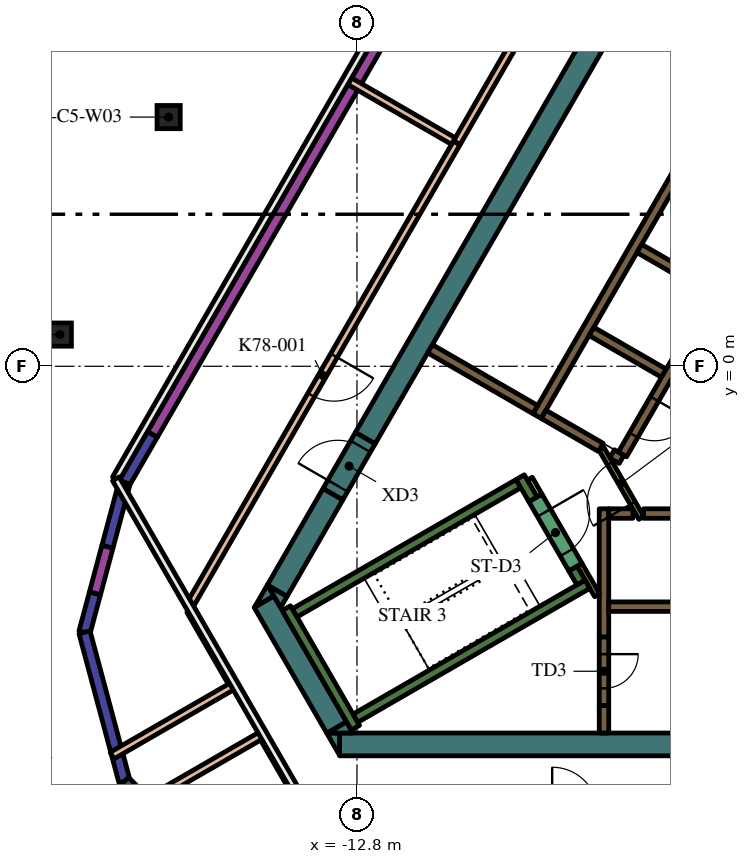
"""IFC4 building model, lengths in metres.
Left out: names, types, materials, properties, quantities, classifications, styles, units other than length and angle.
Written with IfcOpenShell. Run it as: python <this file> out.ifc"""

import sys

from ifc_helpers import new_model, si_unit, direction, frame, frame_2d, origin, origin_2d, place, context, subcontext, project, spatial, polyline, rectangle, hollow_circle, outline, extrude, element, fill, save


model = new_model("IFC4")
c1 = context("Model", 3, precision=1e-05, world=origin(), true_north=direction((0.0, 1.0)))
c2 = subcontext(c1, "Body", "Model", "MODEL_VIEW")
j1 = project(units=[si_unit("LENGTHUNIT", "METRE"), si_unit("PLANEANGLEUNIT", "RADIAN")], contexts=[c1])
p1 = place(None, origin())
s1 = spatial("IfcSite", under=j1, at=p1, CompositionType="ELEMENT")
p2 = place(p1, origin())
s2 = spatial("IfcBuilding", under=s1, at=p2, CompositionType="ELEMENT")
p3 = place(p2, frame((0.0, 0.0, 336.0)))
s3 = spatial("IfcBuildingStorey", under=s2, at=p3, CompositionType="ELEMENT", Elevation=336.0)
for number, where, z_axis, x_axis in (
    (1, (-17.756, 6.557, 0.0), (0.0, 0.0, 1.0), (1.0, 0.0, 0.0)),
    (2, (-20.619, 0.834, 0.0), (0.0, 0.0, 1.0), (1.0, 0.0, 0.0)),
):
    element("IfcColumn", number, at=place(p3, frame(where, z_axis=z_axis, x_axis=x_axis)), inside=s3, PredefinedType="COLUMN", context=c2, shape_type="SweptSolid", body=[
        extrude(hollow_circle(Radius=0.305, WallThickness=0.025, at=origin_2d()), origin(), (0.0, 0.0, 1.0), 4.2),
    ])
p4 = place(p3, frame((8.904, -9.95, 0.0), z_axis=(0.0, 0.0, 1.0), x_axis=(-1.0, 0.0, 0.0)))
e3 = element("IfcWall", 3, at=p4, inside=s3, PredefinedType="SOLIDWALL", context=c2, shape_type="SweptSolid", body=[
    extrude(rectangle(XDim=22.161, YDim=0.6, at=frame_2d((11.081, 0.0))), origin(), (0.0, 0.0, 1.0), 4.2),
])
p5 = place(p3, origin())
e4 = element("IfcWall", 4, at=p5, inside=s3, PredefinedType="SOLIDWALL", context=c2, shape_type="SweptSolid", body=[
    extrude(outline(polyline([(-13.597, -9.65), (-13.259, -9.65), (-13.259, -10.236), (-13.597, -9.65)])), origin(), (0.0, 0.0, 1.0), 4.2),
])
p6 = place(p3, frame((-13.333, -9.506, 0.0), z_axis=(0.0, 0.0, 1.0), x_axis=(-0.500019073792, 0.866014391245, 0.0)))
e5 = element("IfcWall", 5, at=p6, inside=s3, PredefinedType="SOLIDWALL", context=c2, shape_type="SweptSolid", body=[
    extrude(rectangle(XDim=3.823, YDim=0.6, at=frame_2d((1.912, 0.0))), origin(), (0.0, 0.0, 1.0), 4.2),
])
e6 = element("IfcWall", 6, at=p5, inside=s3, PredefinedType="SOLIDWALL", context=c2, shape_type="SweptSolid", body=[
    extrude(outline(polyline([(-14.987, -6.043), (-15.493, -6.335), (-15.156, -5.75), (-14.987, -6.043)])), origin(), (0.0, 0.0, 1.0), 4.2),
])
e7 = element("IfcWall", 7, at=p5, inside=s3, PredefinedType="SOLIDWALL", context=c2, shape_type="SweptSolid", body=[
    extrude(outline(polyline([(-12.904, -9.65), (-13.58, -9.65), (-13.073, -9.357), (-12.904, -9.65)])), origin(), (0.0, 0.0, 1.0), 4.2),
])
p7 = place(p3, frame((-13.432, -3.364, 0.0), z_axis=(0.0, 0.0, 1.0), x_axis=(-0.499960127962, -0.866048422692, 0.0)))
e8 = element("IfcWall", 8, at=p7, inside=s3, PredefinedType="SOLIDWALL", context=c2, shape_type="SweptSolid", body=[
    extrude(rectangle(XDim=2.934, YDim=0.6, at=frame_2d((1.467, 0.0))), origin(), (0.0, 0.0, 1.0), 4.2),
])
e9 = element("IfcWall", 9, at=p5, inside=s3, PredefinedType="SOLIDWALL", context=c2, shape_type="SweptSolid", body=[
    extrude(outline(polyline([(-14.809, -6.35), (-15.147, -5.764), (-14.64, -6.057), (-14.809, -6.35)])), origin(), (0.0, 0.0, 1.0), 4.2),
])
p8 = place(p3, frame((-4.652, 11.842, 0.0), z_axis=(0.0, 0.0, 1.0), x_axis=(-0.500003640647, -0.866023301845, 0.0)))
e10 = element("IfcWall", 10, at=p8, inside=s3, PredefinedType="SOLIDWALL", context=c2, shape_type="SweptSolid", body=[
    extrude(rectangle(XDim=15.858, YDim=0.6, at=frame_2d((7.929, 0.0))), origin(), (0.0, 0.0, 1.0), 4.2),
])
p9 = place(p3, frame((-12.84, -9.511, 0.0), z_axis=(0.0, 0.0, 1.0), x_axis=(-0.499997733992, 0.866026712061, 0.0)))
e11 = element("IfcWall", 11, at=p9, inside=s3, PredefinedType="SOLIDWALL", context=c2, shape_type="SweptSolid", body=[
    extrude(rectangle(XDim=3.634, YDim=0.25, at=frame_2d((1.817, 0.0))), origin(), (0.0, 0.0, 1.0), 4.2),
])
p10 = place(p3, frame((-14.44, -6.49, 0.0), z_axis=(0.0, 0.0, 1.0), x_axis=(0.866022966069, 0.500004222222, 0.0)))
e12 = element("IfcWall", 12, at=p10, inside=s3, PredefinedType="SOLIDWALL", context=c2, shape_type="SweptSolid", body=[
    extrude(rectangle(XDim=6.8, YDim=0.25, at=frame_2d((3.4, 0.0))), origin(), (0.0, 0.0, 1.0), 4.2),
])
p11 = place(p3, frame((-8.168, -3.503, 0.0), z_axis=(0.0, 0.0, 1.0), x_axis=(-0.499952099219, 0.866053057547, 0.0)))
e13 = element("IfcWall", 13, at=p11, inside=s3, PredefinedType="SOLIDWALL", context=c2, shape_type="SweptSolid", body=[
    extrude(rectangle(XDim=0.675, YDim=0.25, at=frame_2d((0.337, 0.0))), origin(), (0.0, 0.0, 1.0), 4.2),
])
p12 = place(p3, frame((-12.84, -9.261, 0.0), z_axis=(0.0, 0.0, 1.0), x_axis=(0.866016039709, 0.500016218704, 0.0)))
e14 = element("IfcWall", 14, at=p12, inside=s3, PredefinedType="SOLIDWALL", context=c2, shape_type="SweptSolid", body=[
    extrude(rectangle(XDim=7.05, YDim=0.25, at=frame_2d((3.525, 0.0))), origin(), (0.0, 0.0, 1.0), 4.2),
])
p13 = place(p3, frame((-6.905, -5.69, 0.0), z_axis=(0.0, 0.0, 1.0), x_axis=(-0.500402024738, 0.865793170242, 0.0)))
e15 = element("IfcWall", 15, at=p13, inside=s3, PredefinedType="SOLIDWALL", context=c2, shape_type="SweptSolid", body=[
    extrude(rectangle(XDim=0.425, YDim=0.25, at=frame_2d((0.212, 0.0))), origin(), (0.0, 0.0, 1.0), 4.2),
])
p14 = place(p3, frame((-5.259, -3.875, 0.0), z_axis=(0.0, 0.0, 1.0), x_axis=(1.0, 0.0, 0.0)))
e16 = element("IfcWall", 16, at=p14, inside=s3, PredefinedType="SOLIDWALL", context=c2, shape_type="SweptSolid", body=[
    extrude(rectangle(XDim=10.489, YDim=0.25, at=frame_2d((5.244, 0.0))), origin(), (0.0, 0.0, 1.0), 4.2),
])
p15 = place(p3, frame((-6.3, -7.125, 0.0), z_axis=(0.0, 0.0, 1.0), x_axis=(0.0, 1.0, 0.0)))
e17 = element("IfcWall", 17, at=p15, inside=s3, PredefinedType="SOLIDWALL", context=c2, shape_type="SweptSolid", body=[
    extrude(rectangle(XDim=3.375, YDim=0.25, at=frame_2d((1.687, 0.0))), origin(), (0.0, 0.0, 1.0), 4.2),
])
p16 = place(p3, frame((-6.175, -3.875, 0.0), z_axis=(0.0, 0.0, 1.0), x_axis=(1.0, 0.0, 0.0)))
e18 = element("IfcWall", 18, at=p16, inside=s3, PredefinedType="SOLIDWALL", context=c2, shape_type="SweptSolid", body=[
    extrude(rectangle(XDim=0.637, YDim=0.25, at=frame_2d((0.318, 0.0))), origin(), (0.0, 0.0, 1.0), 4.2),
])
p17 = place(p3, frame((-6.3, -8.925, 0.0), z_axis=(0.0, 0.0, 1.0), x_axis=(0.0, -1.0, 0.0)))
e19 = element("IfcWall", 19, at=p17, inside=s3, PredefinedType="SOLIDWALL", context=c2, shape_type="SweptSolid", body=[
    extrude(rectangle(XDim=0.725, YDim=0.25, at=frame_2d((0.363, 0.0))), origin(), (0.0, 0.0, 1.0), 4.2),
])
p18 = place(p3, frame((-8.06, -1.311, 0.0), z_axis=(0.0, 0.0, 1.0), x_axis=(0.50000273126, 0.866023826885, 0.0)))
e20 = element("IfcWall", 20, at=p18, inside=s3, PredefinedType="SOLIDWALL", context=c2, shape_type="SweptSolid", body=[
    extrude(rectangle(XDim=10.33, YDim=0.25, at=frame_2d((5.165, 0.0))), origin(), (0.0, 0.0, 1.0), 4.2),
])
for number, where, z_axis, x_axis in (
    (21, (-5.369, 3.1, 0.0), (0.0, 0.0, 1.0), (0.866, -0.5, 0.0)),
    (22, (-4.724, -0.182, 0.0), (0.0, 0.0, 1.0), (-0.866, 0.5, 0.0)),
):
    element("IfcWall", number, at=place(p3, frame(where, z_axis=z_axis, x_axis=x_axis)), inside=s3, PredefinedType="SOLIDWALL", context=c2, shape_type="SweptSolid", body=[
        extrude(rectangle(XDim=2.2, YDim=0.25, at=frame_2d((1.1, 0.0))), origin(), (0.0, 0.0, 1.0), 4.2),
    ])
p19 = place(p3, frame((-6.088, -2.305, 0.0), z_axis=(0.0, 0.0, 1.0), x_axis=(0.866059450854, -0.499941024108, 0.0)))
e23 = element("IfcWall", 23, at=p19, inside=s3, PredefinedType="SOLIDWALL", context=c2, shape_type="SweptSolid", body=[
    extrude(rectangle(XDim=0.29, YDim=0.25, at=frame_2d((0.145, 0.0))), origin(), (0.0, 0.0, 1.0), 4.2),
])
p20 = place(p3, frame((-7.889, -1.265, 0.0), z_axis=(0.0, 0.0, 1.0), x_axis=(0.865986741702, -0.500066958712, 0.0)))
e24 = element("IfcWall", 24, at=p20, inside=s3, PredefinedType="SOLIDWALL", context=c2, shape_type="SweptSolid", body=[
    extrude(rectangle(XDim=1.738, YDim=0.25, at=frame_2d((0.869, 0.0))), origin(), (0.0, 0.0, 1.0), 4.2),
])
p21 = place(p3, frame((-8.106, -1.14, 0.0), z_axis=(0.0, 0.0, 1.0), x_axis=(-0.866008981251, 0.500028443584, 0.0)))
e25 = element("IfcWall", 25, at=p21, inside=s3, PredefinedType="SOLIDWALL", context=c2, shape_type="SweptSolid", body=[
    extrude(rectangle(XDim=3.2, YDim=0.25, at=frame_2d((1.6, 0.0))), origin(), (0.0, 0.0, 1.0), 4.2),
])
p22 = place(p3, frame((-8.252, -2.958, 0.0), z_axis=(0.0, 0.0, 1.0), x_axis=(0.500174715838, -0.865924508047, 0.0)))
e26 = element("IfcWall", 26, at=p22, inside=s3, PredefinedType="PARTITIONING", context=c2, shape_type="SweptSolid", body=[
    extrude(rectangle(XDim=0.514, YDim=0.15, at=frame_2d((0.257, 0.0))), origin(), (0.0, 0.0, 1.0), 3.45),
])
p23 = place(p3, frame((-6.48, -6.027, 0.0), z_axis=(0.0, 0.0, 1.0), x_axis=(-0.499927229454, 0.866067413802, 0.0)))
e27 = element("IfcWall", 27, at=p23, inside=s3, PredefinedType="PARTITIONING", context=c2, shape_type="SweptSolid", body=[
    extrude(rectangle(XDim=0.929, YDim=0.15, at=frame_2d((0.464, 0.0))), origin(), (0.0, 0.0, 1.0), 4.2),
])
p24 = place(p3, frame((-6.175, -6.325, 0.0), z_axis=(0.0, 0.0, 1.0), x_axis=(1.0, 0.0, 0.0)))
e28 = element("IfcWall", 28, at=p24, inside=s3, PredefinedType="SOLIDWALL", context=c2, shape_type="SweptSolid", body=[
    extrude(rectangle(XDim=12.35, YDim=0.25, at=frame_2d((6.175, 0.0))), origin(), (0.0, 0.0, 1.0), 4.2),
])
p25 = place(p24, frame((3.205, 0.0, 0.0)))
e29 = element("IfcOpeningElement", 29, at=p25, cuts=e28, PredefinedType="OPENING", context=c2, shape_type="SweptSolid", body=[
    extrude(rectangle(XDim=0.9, YDim=2.1, at=frame_2d((0.45, 1.05))), frame((0.0, 0.135, 0.0), z_axis=(0.0, -1.0, 0.0), x_axis=(1.0, 0.0, 0.0)), (0.0, 0.0, 1.0), 0.27),
])
p26 = place(p24, frame((8.145, 0.0, 0.0)))
e30 = element("IfcOpeningElement", 30, at=p26, cuts=e28, PredefinedType="OPENING", context=c2, shape_type="SweptSolid", body=[
    extrude(rectangle(XDim=1.1, YDim=2.1, at=frame_2d((0.55, 1.05))), frame((0.0, 0.135, 0.0), z_axis=(0.0, -1.0, 0.0), x_axis=(1.0, 0.0, 0.0)), (0.0, 0.0, 1.0), 0.27),
])
p27 = place(p24, frame((10.665, 0.0, 0.0)))
e31 = element("IfcOpeningElement", 31, at=p27, cuts=e28, PredefinedType="OPENING", context=c2, shape_type="SweptSolid", body=[
    extrude(rectangle(XDim=1.1, YDim=2.1, at=frame_2d((0.55, 1.05))), frame((0.0, 0.135, 0.0), z_axis=(0.0, -1.0, 0.0), x_axis=(1.0, 0.0, 0.0)), (0.0, 0.0, 1.0), 0.27),
])
p28 = place(p3, frame((-0.898, 6.194, 0.0), z_axis=(0.0, 0.0, 1.0), x_axis=(-0.499996202215, -0.866027596426, 0.0)))
e32 = element("IfcWall", 32, at=p28, inside=s3, PredefinedType="SOLIDWALL", context=c2, shape_type="SweptSolid", body=[
    extrude(rectangle(XDim=9.83, YDim=0.25, at=frame_2d((4.915, 0.0))), origin(), (0.0, 0.0, 1.0), 4.2),
])
p29 = place(p28, frame((0.585, 0.0, 0.0)))
e33 = element("IfcOpeningElement", 33, at=p29, cuts=e32, PredefinedType="OPENING", context=c2, shape_type="SweptSolid", body=[
    extrude(rectangle(XDim=1.1, YDim=2.1, at=frame_2d((0.55, 1.05))), frame((0.0, 0.135, 0.0), z_axis=(0.0, -1.0, 0.0), x_axis=(1.0, 0.0, 0.0)), (0.0, 0.0, 1.0), 0.27),
])
p30 = place(p28, frame((3.105, 0.0, 0.0)))
e34 = element("IfcOpeningElement", 34, at=p30, cuts=e32, PredefinedType="OPENING", context=c2, shape_type="SweptSolid", body=[
    extrude(rectangle(XDim=1.1, YDim=2.1, at=frame_2d((0.55, 1.05))), frame((0.0, 0.135, 0.0), z_axis=(0.0, -1.0, 0.0), x_axis=(1.0, 0.0, 0.0)), (0.0, 0.0, 1.0), 0.27),
])
p31 = place(p28, frame((5.625, 0.0, 0.0)))
e35 = element("IfcOpeningElement", 35, at=p31, cuts=e32, PredefinedType="OPENING", context=c2, shape_type="SweptSolid", body=[
    extrude(rectangle(XDim=1.1, YDim=2.1, at=frame_2d((0.55, 1.05))), frame((0.0, 0.135, 0.0), z_axis=(0.0, -1.0, 0.0), x_axis=(1.0, 0.0, 0.0)), (0.0, 0.0, 1.0), 0.27),
])
p32 = place(p28, frame((8.145, 0.0, 0.0)))
e36 = element("IfcOpeningElement", 36, at=p32, cuts=e32, PredefinedType="OPENING", context=c2, shape_type="SweptSolid", body=[
    extrude(rectangle(XDim=1.1, YDim=2.1, at=frame_2d((0.55, 1.05))), frame((0.0, 0.135, 0.0), z_axis=(0.0, -1.0, 0.0), x_axis=(1.0, 0.0, 0.0)), (0.0, 0.0, 1.0), 0.27),
])
p33 = place(p3, frame((-8.103, -3.466, 0.0), z_axis=(0.0, 0.0, 1.0), x_axis=(0.500078061341, -0.865980330357, 0.0)))
e37 = element("IfcWall", 37, at=p33, inside=s3, PredefinedType="SOLIDWALL", context=c2, shape_type="SweptSolid", body=[
    extrude(rectangle(XDim=2.1, YDim=0.4, at=frame_2d((1.05, 0.0))), origin(), (0.0, 0.0, 1.0), 4.2),
])
p34 = place(p33, frame((0.45, 0.0, 0.0)))
e38 = element("IfcOpeningElement", 38, at=p34, cuts=e37, PredefinedType="OPENING", context=c2, shape_type="SweptSolid", body=[
    extrude(rectangle(XDim=1.2, YDim=2.1, at=frame_2d((0.6, 1.05))), frame((0.0, 0.21, 0.0), z_axis=(0.0, -1.0, 0.0), x_axis=(1.0, 0.0, 0.0)), (0.0, 0.0, 1.0), 0.42),
])
p35 = place(p3, frame((-6.3, -7.125, 0.0), z_axis=(0.0, 0.0, 1.0), x_axis=(0.0, -1.0, 0.0)))
e39 = element("IfcWall", 39, at=p35, inside=s3, PredefinedType="SOLIDWALL", context=c2, shape_type="SweptSolid", body=[
    extrude(rectangle(XDim=1.8, YDim=0.25, at=frame_2d((0.9, 0.0))), origin(), (0.0, 0.0, 1.0), 4.2),
])
p36 = place(p35, frame((0.45, 0.0, 0.0)))
e40 = element("IfcOpeningElement", 40, at=p36, cuts=e39, PredefinedType="OPENING", context=c2, shape_type="SweptSolid", body=[
    extrude(rectangle(XDim=0.9, YDim=2.1, at=frame_2d((0.45, 1.05))), frame((0.0, 0.135, 0.0), z_axis=(0.0, -1.0, 0.0), x_axis=(1.0, 0.0, 0.0)), (0.0, 0.0, 1.0), 0.27),
])
p37 = place(p3, frame((-5.317, -3.99, 0.0), z_axis=(0.0, 0.0, 1.0), x_axis=(-0.500027713859, 0.866009402589, 0.0)))
e41 = element("IfcWall", 41, at=p37, inside=s3, PredefinedType="PARTITIONING", context=c2, shape_type="SweptSolid", body=[
    extrude(rectangle(XDim=2.1, YDim=0.15, at=frame_2d((1.05, 0.0))), origin(), (0.0, 0.0, 1.0), 4.2),
])
p38 = place(p37, frame((0.45, 0.0, 0.0)))
e42 = element("IfcOpeningElement", 42, at=p38, cuts=e41, PredefinedType="OPENING", context=c2, shape_type="SweptSolid", body=[
    extrude(rectangle(XDim=1.2, YDim=2.1, at=frame_2d((0.6, 1.05))), frame((0.0, 0.085, 0.0), z_axis=(0.0, -1.0, 0.0), x_axis=(1.0, 0.0, 0.0)), (0.0, 0.0, 1.0), 0.17),
])
p39 = place(p3, frame((-5.659, 9.012, 0.0), z_axis=(0.0, 0.0, 1.0), x_axis=(0.866009402589, -0.500027713859, 0.0)))
e43 = element("IfcWall", 43, at=p39, inside=s3, PredefinedType="PARTITIONING", context=c2, shape_type="SweptSolid", body=[
    extrude(rectangle(XDim=2.1, YDim=0.12, at=frame_2d((1.05, 0.0))), origin(), (0.0, 0.0, 1.0), 3.45),
])
p40 = place(p39, frame((0.45, 0.0, 0.0)))
e44 = element("IfcOpeningElement", 44, at=p40, cuts=e43, PredefinedType="OPENING", context=c2, shape_type="SweptSolid", body=[
    extrude(rectangle(XDim=1.2, YDim=2.1, at=frame_2d((0.6, 1.05))), frame((0.0, 0.07, 0.0), z_axis=(0.0, -1.0, 0.0), x_axis=(1.0, 0.0, 0.0)), (0.0, 0.0, 1.0), 0.14),
])
p41 = place(p3, frame((-13.432, -3.364, 0.0), z_axis=(0.0, 0.0, 1.0), x_axis=(0.500000056704, 0.866025371046, 0.0)))
e45 = element("IfcWall", 45, at=p41, inside=s3, PredefinedType="SOLIDWALL", context=c2, shape_type="SweptSolid", body=[
    extrude(rectangle(XDim=1.7, YDim=0.6, at=frame_2d((0.85, 0.0))), origin(), (0.0, 0.0, 1.0), 4.2),
])
p42 = place(p41, frame((0.25, 0.0, 0.0)))
e46 = element("IfcOpeningElement", 46, at=p42, cuts=e45, PredefinedType="OPENING", context=c2, shape_type="SweptSolid", body=[
    extrude(rectangle(XDim=1.2, YDim=2.1, at=frame_2d((0.6, 1.05))), frame((0.0, 0.31, 0.0), z_axis=(0.0, -1.0, 0.0), x_axis=(1.0, 0.0, 0.0)), (0.0, 0.0, 1.0), 0.62),
])
p43 = place(p3, frame((-10.176, 5.875, 0.0), z_axis=(0.0, 0.0, 1.0), x_axis=(-0.499989432091, -0.866031505083, 0.0)))
e47 = element("IfcWall", 47, at=p43, inside=s3, PredefinedType="PARTITIONING", context=c2, shape_type="SweptSolid", body=[
    extrude(rectangle(XDim=14.116, YDim=0.2, at=frame_2d((7.058, 0.0))), origin(), (0.0, 0.0, 1.0), 3.45),
])
p44 = place(p43, frame((6.458, 0.0, 0.0)))
e48 = element("IfcOpeningElement", 48, at=p44, cuts=e47, PredefinedType="OPENING", context=c2, shape_type="SweptSolid", body=[
    extrude(rectangle(XDim=1.2, YDim=2.1, at=frame_2d((0.6, 1.05))), frame((0.0, 0.11, 0.0), z_axis=(0.0, -1.0, 0.0), x_axis=(1.0, 0.0, 0.0)), (0.0, 0.0, 1.0), 0.22),
])
p45 = place(p3, frame((-3.118, 18.1, 0.0), z_axis=(0.0, 0.0, 1.0), x_axis=(-0.499999609035, -0.866025629508, 0.0)))
e49 = element("IfcWall", 49, at=p45, inside=s3, PredefinedType="PARTITIONING", context=c2, shape_type="SweptSolid", body=[
    extrude(rectangle(XDim=14.106, YDim=0.2, at=frame_2d((7.053, 0.0))), origin(), (0.0, 0.0, 1.0), 3.45),
])
p46 = place(p45, frame((6.453, 0.0, 0.0)))
e50 = element("IfcOpeningElement", 50, at=p46, cuts=e49, PredefinedType="OPENING", context=c2, shape_type="SweptSolid", body=[
    extrude(rectangle(XDim=1.2, YDim=2.1, at=frame_2d((0.6, 1.05))), frame((0.0, 0.11, 0.0), z_axis=(0.0, -1.0, 0.0), x_axis=(1.0, 0.0, 0.0)), (0.0, 0.0, 1.0), 0.22),
])
for number, where, z_axis, x_axis in (
    (51, (-19.244, -10.245, 0.0), (0.0, 0.0, 1.0), (0.866, 0.5, 0.0)),
    (52, (-15.3, -9.699, 0.0), (0.0, 0.0, 1.0), (-0.866, -0.5, 0.0)),
):
    element("IfcWall", number, at=place(p3, frame(where, z_axis=z_axis, x_axis=x_axis)), inside=s3, PredefinedType="PARTITIONING", context=c2, shape_type="SweptSolid", body=[
        extrude(rectangle(XDim=3.688, YDim=0.2, at=frame_2d((1.844, 0.0))), origin(), (0.0, 0.0, 1.0), 3.45),
    ])
p47 = place(p3, frame((-12.99, 7.5, 0.0), z_axis=(0.0, 0.0, 1.0), x_axis=(0.866035871367, -0.499981869177, 0.0)))
e53 = element("IfcWall", 53, at=p47, inside=s3, PredefinedType="PARTITIONING", context=c2, shape_type="SweptSolid", body=[
    extrude(rectangle(XDim=3.15, YDim=0.2, at=frame_2d((1.575, 0.0))), origin(), (0.0, 0.0, 1.0), 3.45),
])
for number, where, z_axis, x_axis in (
    (54, (-16.1, -8.314, 0.0), (0.0, 0.0, 1.0), (-0.5, 0.866, 0.0)),
    (55, (-14.161, -11.672, 0.0), (0.0, 0.0, 1.0), (-0.5, 0.866, 0.0)),
):
    element("IfcWall", number, at=place(p3, frame(where, z_axis=z_axis, x_axis=x_axis)), inside=s3, PredefinedType="PARTITIONING", context=c2, shape_type="SweptSolid", body=[
        extrude(rectangle(XDim=2.178, YDim=0.2, at=frame_2d((1.089, 0.0))), origin(), (0.0, 0.0, 1.0), 3.45),
    ])
p48 = place(p3, frame((-7.54, 16.64, 0.0), z_axis=(0.0, 0.0, 1.0), x_axis=(-0.500002158106, -0.866024157798, 0.0)))
e56 = element("IfcWall", 56, at=p48, inside=s3, PredefinedType="SOLIDWALL", context=c2, shape_type="SweptSolid", body=[
    extrude(rectangle(XDim=21.282, YDim=0.3, at=frame_2d((10.641, 0.0))), origin(), (0.0, 0.0, 1.0), 3.45),
])
p49 = place(p3, frame((-18.181, -1.79, 0.0), z_axis=(0.0, 0.0, 1.0), x_axis=(-0.500049712553, -0.865996700326, 0.0)))
e57 = element("IfcWall", 57, at=p49, inside=s3, PredefinedType="SOLIDWALL", context=c2, shape_type="SweptSolid", body=[
    extrude(rectangle(XDim=1.464, YDim=0.3, at=frame_2d((0.732, 0.0))), origin(), (0.0, 0.0, 1.0), 3.95),
])
p50 = place(p3, frame((-18.913, -3.058, 0.0), z_axis=(0.0, 0.0, 1.0), x_axis=(-0.258824282894, -0.965924422812, 0.0)))
e58 = element("IfcWall", 58, at=p50, inside=s3, PredefinedType="SOLIDWALL", context=c2, shape_type="SweptSolid", body=[
    extrude(rectangle(XDim=1.753, YDim=0.3, at=frame_2d((0.876, 0.0))), origin(), (0.0, 0.0, 1.0), 3.95),
])
p51 = place(p3, frame((-19.366, -4.751, 0.0), z_axis=(0.0, 0.0, 1.0), x_axis=(-0.258816538161, -0.965926498018, 0.0)))
e59 = element("IfcWall", 59, at=p51, inside=s3, PredefinedType="SOLIDWALL", context=c2, shape_type="SweptSolid", body=[
    extrude(rectangle(XDim=1.264, YDim=0.3, at=frame_2d((0.632, 0.0))), origin(), (0.0, 0.0, 1.0), 3.45),
])
p52 = place(p3, frame((-19.694, -5.972, 0.0), z_axis=(0.0, 0.0, 1.0), x_axis=(-0.258690231517, -0.96596033258, 0.0)))
e60 = element("IfcWall", 60, at=p52, inside=s3, PredefinedType="SOLIDWALL", context=c2, shape_type="SweptSolid", body=[
    extrude(rectangle(XDim=1.064, YDim=0.3, at=frame_2d((0.532, 0.0))), origin(), (0.0, 0.0, 1.0), 3.95),
])
for number, where, z_axis, x_axis in (
    (61, (-19.969, -7.0, 0.0), (0.0, 0.0, 1.0), (0.259, -0.966, 0.0)),
    (62, (-18.918, -10.922, 0.0), (0.0, 0.0, 1.0), (0.707, -0.707, 0.0)),
):
    element("IfcWall", number, at=place(p3, frame(where, z_axis=z_axis, x_axis=x_axis)), inside=s3, PredefinedType="SOLIDWALL", context=c2, shape_type="SweptSolid", body=[
        extrude(rectangle(XDim=4.061, YDim=0.3, at=frame_2d((2.03, 0.0))), origin(), (0.0, 0.0, 1.0), 3.95),
    ])
p53 = place(p32, origin())
e63 = element("IfcDoor", 63, at=p53, inside=s3, OperationType="DOUBLE_DOOR_SLIDING", PredefinedType="DOOR", context=c2, shape_type="SweptSolid", body=[
    extrude(rectangle(XDim=1.1, YDim=2.1, at=frame_2d((0.55, 1.05))), frame((0.0, 0.025, 0.0), z_axis=(0.0, -1.0, 0.0), x_axis=(1.0, 0.0, 0.0)), (0.0, 0.0, 1.0), 0.05),
])
fill(e36, e63)
p54 = place(p34, origin())
e64 = element("IfcDoor", 64, at=p54, inside=s3, OperationType="SINGLE_SWING_LEFT", PredefinedType="DOOR", context=c2, shape_type="SweptSolid", body=[
    extrude(rectangle(XDim=1.2, YDim=2.1, at=frame_2d((0.6, 1.05))), frame((0.0, 0.025, 0.0), z_axis=(0.0, -1.0, 0.0), x_axis=(1.0, 0.0, 0.0)), (0.0, 0.0, 1.0), 0.05),
])
fill(e38, e64)
p55 = place(p36, origin())
e65 = element("IfcDoor", 65, at=p55, inside=s3, OperationType="SINGLE_SWING_LEFT", PredefinedType="DOOR", context=c2, shape_type="SweptSolid", body=[
    extrude(rectangle(XDim=0.9, YDim=2.1, at=frame_2d((0.45, 1.05))), frame((0.0, 0.025, 0.0), z_axis=(0.0, -1.0, 0.0), x_axis=(1.0, 0.0, 0.0)), (0.0, 0.0, 1.0), 0.05),
])
fill(e40, e65)
p56 = place(p38, origin())
e66 = element("IfcDoor", 66, at=p56, inside=s3, OperationType="SINGLE_SWING_LEFT", PredefinedType="DOOR", context=c2, shape_type="SweptSolid", body=[
    extrude(rectangle(XDim=1.2, YDim=2.1, at=frame_2d((0.6, 1.05))), frame((0.0, 0.025, 0.0), z_axis=(0.0, -1.0, 0.0), x_axis=(1.0, 0.0, 0.0)), (0.0, 0.0, 1.0), 0.05),
])
fill(e42, e66)
p57 = place(p40, origin())
e67 = element("IfcDoor", 67, at=p57, inside=s3, OperationType="SINGLE_SWING_LEFT", PredefinedType="DOOR", context=c2, shape_type="SweptSolid", body=[
    extrude(rectangle(XDim=1.2, YDim=2.1, at=frame_2d((0.6, 1.05))), frame((0.0, 0.025, 0.0), z_axis=(0.0, -1.0, 0.0), x_axis=(1.0, 0.0, 0.0)), (0.0, 0.0, 1.0), 0.05),
])
fill(e44, e67)
p58 = place(p42, origin())
e68 = element("IfcDoor", 68, at=p58, inside=s3, OperationType="SINGLE_SWING_LEFT", PredefinedType="DOOR", context=c2, shape_type="SweptSolid", body=[
    extrude(rectangle(XDim=1.2, YDim=2.1, at=frame_2d((0.6, 1.05))), frame((0.0, 0.025, 0.0), z_axis=(0.0, -1.0, 0.0), x_axis=(1.0, 0.0, 0.0)), (0.0, 0.0, 1.0), 0.05),
])
fill(e46, e68)
p59 = place(p44, origin())
e69 = element("IfcDoor", 69, at=p59, inside=s3, OperationType="SINGLE_SWING_RIGHT", PredefinedType="DOOR", context=c2, shape_type="SweptSolid", body=[
    extrude(rectangle(XDim=1.2, YDim=2.1, at=frame_2d((0.6, 1.05))), frame((0.0, 0.025, 0.0), z_axis=(0.0, -1.0, 0.0), x_axis=(1.0, 0.0, 0.0)), (0.0, 0.0, 1.0), 0.05),
])
fill(e48, e69)
save(model, sys.argv[1])
